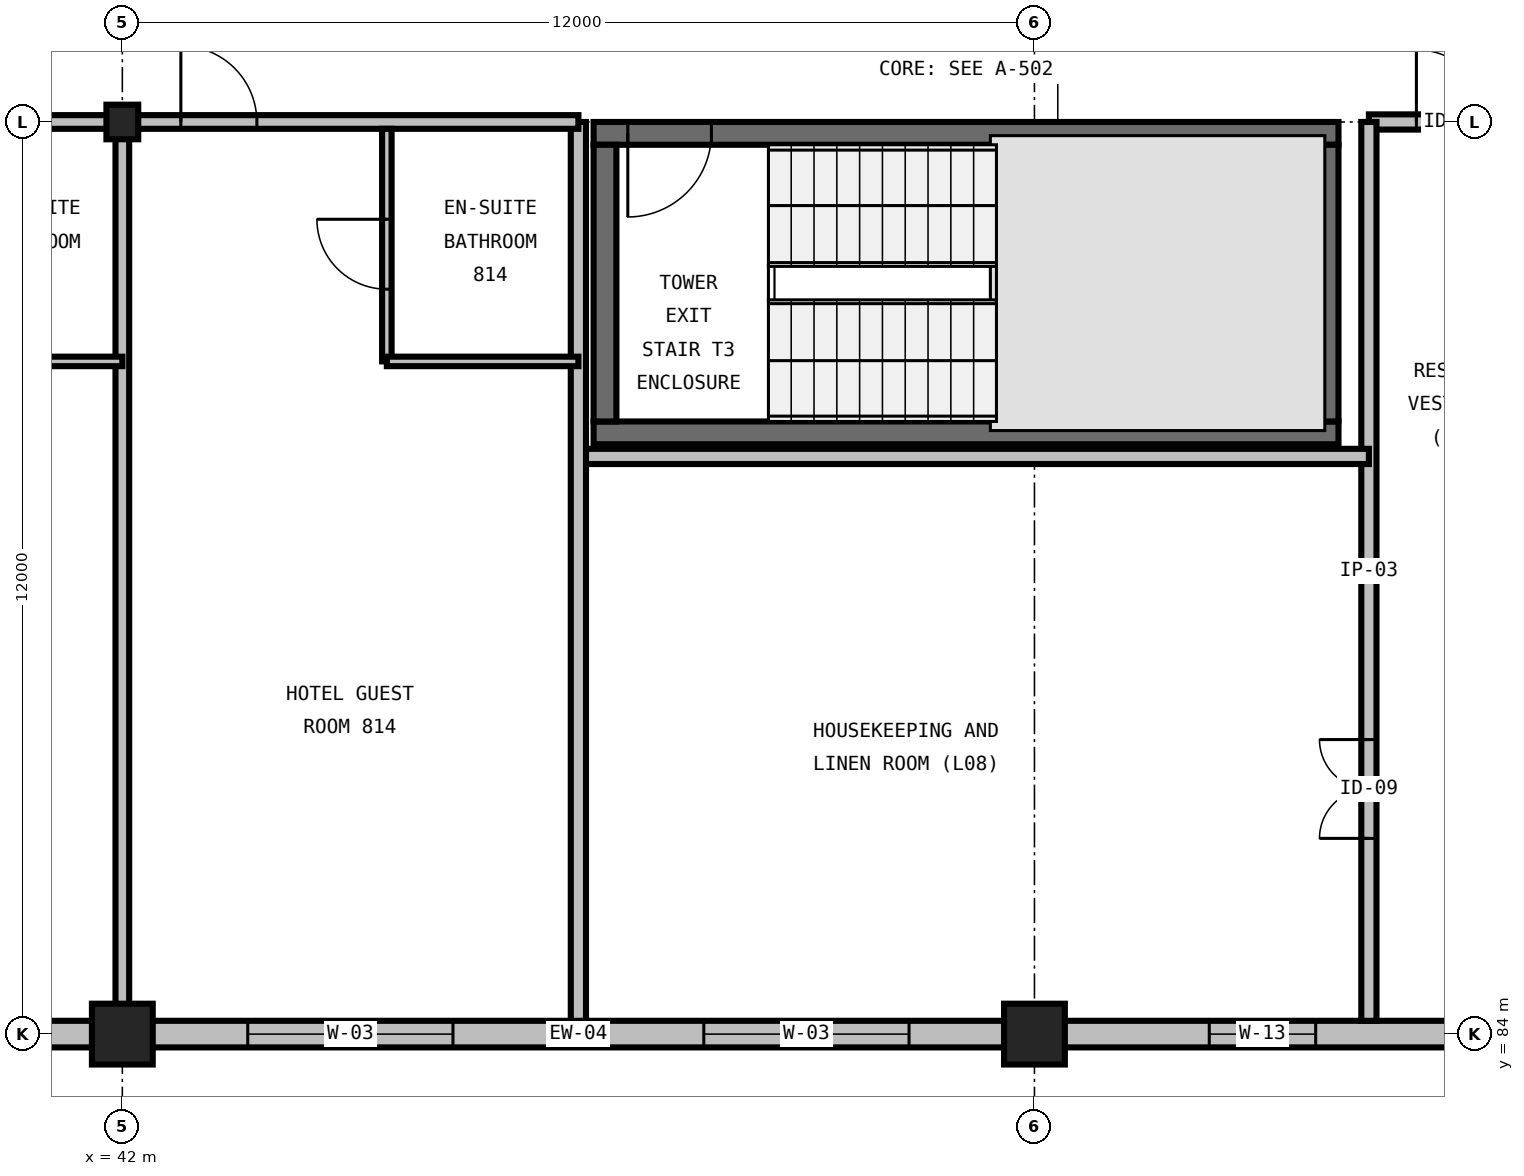
"""IFC4 building model, lengths in metres.
Left out: names, types, materials, properties, quantities, classifications, styles, units other than length and angle.
Written with IfcOpenShell. Run it as: python <this file> out.ifc"""

import sys

from ifc_helpers import new_model, si_unit, direction, frame, frame_2d, origin, origin_2d, place, context, subcontext, project, spatial, rectangle, i_section, extrude, element, fill, save


model = new_model("IFC4")
c1 = context("Model", 3, precision=1e-05, world=origin(), true_north=direction((0.0, 1.0)))
c2 = subcontext(c1, "Body", "Model", "MODEL_VIEW")
j1 = project(units=[si_unit("LENGTHUNIT", "METRE"), si_unit("PLANEANGLEUNIT", "RADIAN")], contexts=[c1])
p1 = place(None, origin())
s1 = spatial("IfcSite", under=j1, at=p1, CompositionType="ELEMENT")
p2 = place(p1, origin())
s2 = spatial("IfcBuilding", under=s1, at=p2, CompositionType="ELEMENT")
p3 = place(p2, frame((0.0, 0.0, 38.4)))
s3 = spatial("IfcBuildingStorey", under=s2, at=p3, CompositionType="ELEMENT", Elevation=38.4)
p4 = place(p3, frame((42.0, 84.0, 0.0), z_axis=(0.0, 0.0, 1.0), x_axis=(1.0, 0.0, 0.0)))
e1 = element("IfcColumn", 1, at=p4, inside=s3, PredefinedType="COLUMN", context=c2, shape_type="SweptSolid", body=[
    extrude(rectangle(XDim=0.8, YDim=0.8, at=origin_2d()), origin(), (0.0, 0.0, 1.0), 3.6),
])
p5 = place(p3, frame((42.0, 96.0, 0.0), z_axis=(0.0, 0.0, 1.0), x_axis=(1.0, 0.0, 0.0)))
e2 = element("IfcColumn", 2, at=p5, inside=s3, PredefinedType="COLUMN", context=c2, shape_type="SweptSolid", body=[
    extrude(i_section(OverallWidth=0.419, OverallDepth=0.455, WebThickness=0.042, FlangeThickness=0.068, FilletRadius=0.031, at=origin_2d()), origin(), (0.0, 0.0, 1.0), 3.6),
])
p6 = place(p3, frame((54.0, 84.0, 0.0), z_axis=(0.0, 0.0, 1.0), x_axis=(1.0, 0.0, 0.0)))
e3 = element("IfcColumn", 3, at=p6, inside=s3, PredefinedType="COLUMN", context=c2, shape_type="SweptSolid", body=[
    extrude(rectangle(XDim=0.8, YDim=0.8, at=origin_2d()), origin(), (0.0, 0.0, 1.0), 3.6),
])
p7 = place(p3, frame((48.2, 91.91, 0.0), z_axis=(0.0, 0.0, 1.0), x_axis=(1.0, 0.0, 0.0)))
e4 = element("IfcWall", 4, at=p7, inside=s3, PredefinedType="SHEAR", context=c2, shape_type="SweptSolid", body=[
    extrude(rectangle(XDim=9.8, YDim=0.3, at=frame_2d((4.9, 0.0))), origin(), (0.0, 0.0, 1.0), 3.6),
])
p8 = place(p3, frame((58.0, 95.85, 0.0), z_axis=(0.0, 0.0, 1.0), x_axis=(-1.0, 0.0, 0.0)))
e5 = element("IfcWall", 5, at=p8, inside=s3, PredefinedType="SHEAR", context=c2, shape_type="SweptSolid", body=[
    extrude(rectangle(XDim=9.8, YDim=0.3, at=frame_2d((4.9, 0.0))), origin(), (0.0, 0.0, 1.0), 3.6),
])
p9 = place(p8, frame((8.25, 0.0, 0.0)))
e6 = element("IfcOpeningElement", 6, at=p9, cuts=e5, PredefinedType="OPENING", context=c2, shape_type="SweptSolid", body=[
    extrude(rectangle(XDim=1.1, YDim=2.2, at=frame_2d((0.55, 1.1))), frame((0.0, 0.165, 0.0), z_axis=(0.0, -1.0, 0.0), x_axis=(1.0, 0.0, 0.0)), (0.0, 0.0, 1.0), 0.33),
])
for number, where, z_axis, x_axis in (
    (7, (48.35, 95.7, 0.0), (0.0, 0.0, 1.0), (0.0, -1.0, 0.0)),
    (8, (57.85, 92.06, 0.0), (0.0, 0.0, 1.0), (0.0, 1.0, 0.0)),
):
    element("IfcWall", number, at=place(p3, frame(where, z_axis=z_axis, x_axis=x_axis)), inside=s3, PredefinedType="SHEAR", context=c2, shape_type="SweptSolid", body=[
        extrude(rectangle(XDim=3.64, YDim=0.3, at=frame_2d((1.82, 0.0))), origin(), (0.0, 0.0, 1.0), 3.6),
    ])
p10 = place(p3, frame((36.0, 84.0, 0.0), z_axis=(0.0, 0.0, 1.0), x_axis=(1.0, 0.0, 0.0)))
e9 = element("IfcWall", 9, at=p10, inside=s3, PredefinedType="STANDARD", context=c2, shape_type="SweptSolid", body=[
    extrude(rectangle(XDim=6.0, YDim=0.35, at=frame_2d((3.0, 0.0))), origin(), (0.0, 0.0, 1.0), 2.486),
])
p11 = place(p10, frame((1.65, 0.0, 0.72)))
e10 = element("IfcOpeningElement", 10, at=p11, cuts=e9, PredefinedType="OPENING", context=c2, shape_type="SweptSolid", body=[
    extrude(rectangle(XDim=2.7, YDim=1.65, at=frame_2d((1.35, 0.825))), frame((0.0, 0.19, 0.0), z_axis=(0.0, -1.0, 0.0), x_axis=(1.0, 0.0, 0.0)), (0.0, 0.0, 1.0), 0.38),
])
p12 = place(p3, frame((42.0, 84.0, 0.0), z_axis=(0.0, 0.0, 1.0), x_axis=(1.0, 0.0, 0.0)))
e11 = element("IfcWall", 11, at=p12, inside=s3, PredefinedType="STANDARD", context=c2, shape_type="SweptSolid", body=[
    extrude(rectangle(XDim=12.0, YDim=0.35, at=frame_2d((6.0, 0.0))), origin(), (0.0, 0.0, 1.0), 2.486),
])
p13 = place(p12, frame((1.65, 0.0, 0.72)))
e12 = element("IfcOpeningElement", 12, at=p13, cuts=e11, PredefinedType="OPENING", context=c2, shape_type="SweptSolid", body=[
    extrude(rectangle(XDim=2.7, YDim=1.65, at=frame_2d((1.35, 0.825))), frame((0.0, 0.19, 0.0), z_axis=(0.0, -1.0, 0.0), x_axis=(1.0, 0.0, 0.0)), (0.0, 0.0, 1.0), 0.38),
])
p14 = place(p12, frame((7.65, 0.0, 0.72)))
e13 = element("IfcOpeningElement", 13, at=p14, cuts=e11, PredefinedType="OPENING", context=c2, shape_type="SweptSolid", body=[
    extrude(rectangle(XDim=2.7, YDim=1.65, at=frame_2d((1.35, 0.825))), frame((0.0, 0.19, 0.0), z_axis=(0.0, -1.0, 0.0), x_axis=(1.0, 0.0, 0.0)), (0.0, 0.0, 1.0), 0.38),
])
p15 = place(p3, frame((54.0, 84.0, 0.0), z_axis=(0.0, 0.0, 1.0), x_axis=(1.0, 0.0, 0.0)))
e14 = element("IfcWall", 14, at=p15, inside=s3, PredefinedType="STANDARD", context=c2, shape_type="SweptSolid", body=[
    extrude(rectangle(XDim=12.0, YDim=0.35, at=frame_2d((6.0, 0.0))), origin(), (0.0, 0.0, 1.0), 2.486),
])
p16 = place(p15, frame((2.3, 0.0, 1.0)))
e15 = element("IfcOpeningElement", 15, at=p16, cuts=e14, PredefinedType="OPENING", context=c2, shape_type="SweptSolid", body=[
    extrude(rectangle(XDim=1.4, YDim=1.4, at=frame_2d((0.7, 0.7))), frame((0.0, 0.19, 0.0), z_axis=(0.0, -1.0, 0.0), x_axis=(1.0, 0.0, 0.0)), (0.0, 0.0, 1.0), 0.38),
])
p17 = place(p15, frame((8.25, 0.0, 1.0)))
e16 = element("IfcOpeningElement", 16, at=p17, cuts=e14, PredefinedType="OPENING", context=c2, shape_type="SweptSolid", body=[
    extrude(rectangle(XDim=1.5, YDim=1.35, at=frame_2d((0.75, 0.675))), frame((0.0, 0.19, 0.0), z_axis=(0.0, -1.0, 0.0), x_axis=(1.0, 0.0, 0.0)), (0.0, 0.0, 1.0), 0.38),
])
p18 = place(p3, frame((58.4, 96.0, 0.0), z_axis=(0.0, 0.0, 1.0), x_axis=(1.0, 0.0, 0.0)))
e17 = element("IfcWall", 17, at=p18, inside=s3, PredefinedType="PARTITIONING", context=c2, shape_type="SweptSolid", body=[
    extrude(rectangle(XDim=2.4, YDim=0.2, at=frame_2d((1.2, 0.0))), origin(), (0.0, 0.0, 1.0), 2.359),
])
p19 = place(p18, frame((0.625, 0.0, 0.0)))
e18 = element("IfcOpeningElement", 18, at=p19, cuts=e17, PredefinedType="OPENING", context=c2, shape_type="SweptSolid", body=[
    extrude(rectangle(XDim=0.95, YDim=2.15, at=frame_2d((0.475, 1.075))), frame((0.0, 0.115, 0.0), z_axis=(0.0, -1.0, 0.0), x_axis=(1.0, 0.0, 0.0)), (0.0, 0.0, 1.0), 0.23),
])
p20 = place(p3, frame((58.4, 84.175, 0.0), z_axis=(0.0, 0.0, 1.0), x_axis=(0.0, 1.0, 0.0)))
e19 = element("IfcWall", 19, at=p20, inside=s3, PredefinedType="PARTITIONING", context=c2, shape_type="SweptSolid", body=[
    extrude(rectangle(XDim=11.825, YDim=0.2, at=frame_2d((5.913, 0.0))), origin(), (0.0, 0.0, 1.0), 3.29),
])
p21 = place(p20, frame((2.4, 0.0, 0.0)))
e20 = element("IfcOpeningElement", 20, at=p21, cuts=e19, PredefinedType="OPENING", context=c2, shape_type="SweptSolid", body=[
    extrude(rectangle(XDim=1.3, YDim=2.2, at=frame_2d((0.65, 1.1))), frame((0.0, 0.115, 0.0), z_axis=(0.0, -1.0, 0.0), x_axis=(1.0, 0.0, 0.0)), (0.0, 0.0, 1.0), 0.23),
])
p22 = place(p3, frame((48.0, 91.6, 0.0), z_axis=(0.0, 0.0, 1.0), x_axis=(1.0, 0.0, 0.0)))
e21 = element("IfcWall", 21, at=p22, inside=s3, PredefinedType="PARTITIONING", context=c2, shape_type="SweptSolid", body=[
    extrude(rectangle(XDim=10.4, YDim=0.2, at=frame_2d((5.2, 0.0))), origin(), (0.0, 0.0, 1.0), 3.29),
])
p23 = place(p3, frame((48.0, 84.175, 0.0), z_axis=(0.0, 0.0, 1.0), x_axis=(0.0, 1.0, 0.0)))
e22 = element("IfcWall", 22, at=p23, inside=s3, PredefinedType="PARTITIONING", context=c2, shape_type="SweptSolid", body=[
    extrude(rectangle(XDim=11.825, YDim=0.2, at=frame_2d((5.913, 0.0))), origin(), (0.0, 0.0, 1.0), 3.29),
])
p24 = place(p3, frame((36.0, 96.0, 0.0), z_axis=(0.0, 0.0, 1.0), x_axis=(1.0, 0.0, 0.0)))
e23 = element("IfcWall", 23, at=p24, inside=s3, PredefinedType="PARTITIONING", context=c2, shape_type="SweptSolid", body=[
    extrude(rectangle(XDim=6.0, YDim=0.18, at=frame_2d((3.0, 0.0))), origin(), (0.0, 0.0, 1.0), 2.736),
])
p25 = place(p24, frame((0.77, 0.0, 0.0)))
e24 = element("IfcOpeningElement", 24, at=p25, cuts=e23, PredefinedType="OPENING", context=c2, shape_type="SweptSolid", body=[
    extrude(rectangle(XDim=1.0, YDim=2.15, at=frame_2d((0.5, 1.075))), frame((0.0, 0.105, 0.0), z_axis=(0.0, -1.0, 0.0), x_axis=(1.0, 0.0, 0.0)), (0.0, 0.0, 1.0), 0.21),
])
p26 = place(p3, frame((42.0, 84.175, 0.0), z_axis=(0.0, 0.0, 1.0), x_axis=(0.0, 1.0, 0.0)))
e25 = element("IfcWall", 25, at=p26, inside=s3, PredefinedType="PARTITIONING", context=c2, shape_type="SweptSolid", body=[
    extrude(rectangle(XDim=11.825, YDim=0.18, at=frame_2d((5.913, 0.0))), origin(), (0.0, 0.0, 1.0), 2.59),
])
p27 = place(p3, frame((39.48, 92.85, 0.0), z_axis=(0.0, 0.0, 1.0), x_axis=(1.0, 0.0, 0.0)))
e26 = element("IfcWall", 26, at=p27, inside=s3, PredefinedType="PARTITIONING", context=c2, shape_type="SweptSolid", body=[
    extrude(rectangle(XDim=2.52, YDim=0.125, at=frame_2d((1.26, 0.0))), origin(), (0.0, 0.0, 1.0), 3.29),
])
p28 = place(p3, frame((42.0, 96.0, 0.0), z_axis=(0.0, 0.0, 1.0), x_axis=(1.0, 0.0, 0.0)))
e27 = element("IfcWall", 27, at=p28, inside=s3, PredefinedType="PARTITIONING", context=c2, shape_type="SweptSolid", body=[
    extrude(rectangle(XDim=6.0, YDim=0.18, at=frame_2d((3.0, 0.0))), origin(), (0.0, 0.0, 1.0), 2.359),
])
p29 = place(p28, frame((0.77, 0.0, 0.0)))
e28 = element("IfcOpeningElement", 28, at=p29, cuts=e27, PredefinedType="OPENING", context=c2, shape_type="SweptSolid", body=[
    extrude(rectangle(XDim=1.0, YDim=2.15, at=frame_2d((0.5, 1.075))), frame((0.0, 0.105, 0.0), z_axis=(0.0, -1.0, 0.0), x_axis=(1.0, 0.0, 0.0)), (0.0, 0.0, 1.0), 0.21),
])
p30 = place(p3, frame((45.48, 92.85, 0.0), z_axis=(0.0, 0.0, 1.0), x_axis=(0.0, 1.0, 0.0)))
e29 = element("IfcWall", 29, at=p30, inside=s3, PredefinedType="PARTITIONING", context=c2, shape_type="SweptSolid", body=[
    extrude(rectangle(XDim=3.06, YDim=0.125, at=frame_2d((1.53, 0.0))), origin(), (0.0, 0.0, 1.0), 3.29),
])
p31 = place(p30, frame((0.95, 0.0, 0.0)))
e30 = element("IfcOpeningElement", 30, at=p31, cuts=e29, PredefinedType="OPENING", context=c2, shape_type="SweptSolid", body=[
    extrude(rectangle(XDim=0.92, YDim=2.1, at=frame_2d((0.46, 1.05))), frame((0.0, 0.077, 0.0), z_axis=(0.0, -1.0, 0.0), x_axis=(1.0, 0.0, 0.0)), (0.0, 0.0, 1.0), 0.155),
])
p32 = place(p3, frame((45.48, 92.85, 0.0), z_axis=(0.0, 0.0, 1.0), x_axis=(1.0, 0.0, 0.0)))
e31 = element("IfcWall", 31, at=p32, inside=s3, PredefinedType="PARTITIONING", context=c2, shape_type="SweptSolid", body=[
    extrude(rectangle(XDim=2.52, YDim=0.125, at=frame_2d((1.26, 0.0))), origin(), (0.0, 0.0, 1.0), 3.29),
])
p33 = place(p9, origin())
e32 = element("IfcDoor", 32, at=p33, inside=s3, OperationType="SINGLE_SWING_RIGHT", PredefinedType="DOOR", context=c2, shape_type="SweptSolid", body=[
    extrude(rectangle(XDim=1.1, YDim=2.2, at=frame_2d((0.55, 1.1))), frame((0.0, 0.025, 0.0), z_axis=(0.0, -1.0, 0.0), x_axis=(1.0, 0.0, 0.0)), (0.0, 0.0, 1.0), 0.05),
])
fill(e6, e32)
p34 = place(p13, origin())
e33 = element("IfcWindow", 33, at=p34, inside=s3, PartitioningType="TRIPLE_PANEL_VERTICAL", PredefinedType="WINDOW", context=c2, shape_type="SweptSolid", body=[
    extrude(rectangle(XDim=2.7, YDim=1.65, at=frame_2d((1.35, 0.825))), frame((0.0, 0.03, 0.0), z_axis=(0.0, -1.0, 0.0), x_axis=(1.0, 0.0, 0.0)), (0.0, 0.0, 1.0), 0.06),
])
fill(e12, e33)
p35 = place(p14, origin())
e34 = element("IfcWindow", 34, at=p35, inside=s3, PartitioningType="TRIPLE_PANEL_VERTICAL", PredefinedType="WINDOW", context=c2, shape_type="SweptSolid", body=[
    extrude(rectangle(XDim=2.7, YDim=1.65, at=frame_2d((1.35, 0.825))), frame((0.0, 0.03, 0.0), z_axis=(0.0, -1.0, 0.0), x_axis=(1.0, 0.0, 0.0)), (0.0, 0.0, 1.0), 0.06),
])
fill(e13, e34)
p36 = place(p16, origin())
e35 = element("IfcWindow", 35, at=p36, inside=s3, PartitioningType="SINGLE_PANEL", PredefinedType="WINDOW", context=c2, shape_type="SweptSolid", body=[
    extrude(rectangle(XDim=1.4, YDim=1.4, at=frame_2d((0.7, 0.7))), frame((0.0, 0.03, 0.0), z_axis=(0.0, -1.0, 0.0), x_axis=(1.0, 0.0, 0.0)), (0.0, 0.0, 1.0), 0.06),
])
fill(e15, e35)
p37 = place(p19, origin())
e36 = element("IfcDoor", 36, at=p37, inside=s3, OperationType="SINGLE_SWING_LEFT", PredefinedType="DOOR", context=c2, shape_type="SweptSolid", body=[
    extrude(rectangle(XDim=0.95, YDim=2.15, at=frame_2d((0.475, 1.075))), frame((0.0, 0.025, 0.0), z_axis=(0.0, -1.0, 0.0), x_axis=(1.0, 0.0, 0.0)), (0.0, 0.0, 1.0), 0.05),
])
fill(e18, e36)
p38 = place(p21, origin())
e37 = element("IfcDoor", 37, at=p38, inside=s3, OperationType="DOUBLE_DOOR_SINGLE_SWING", PredefinedType="DOOR", context=c2, shape_type="SweptSolid", body=[
    extrude(rectangle(XDim=1.3, YDim=2.2, at=frame_2d((0.65, 1.1))), frame((0.0, 0.025, 0.0), z_axis=(0.0, -1.0, 0.0), x_axis=(1.0, 0.0, 0.0)), (0.0, 0.0, 1.0), 0.05),
])
fill(e20, e37)
p39 = place(p29, origin())
e38 = element("IfcDoor", 38, at=p39, inside=s3, OperationType="SINGLE_SWING_LEFT", PredefinedType="DOOR", context=c2, shape_type="SweptSolid", body=[
    extrude(rectangle(XDim=1.0, YDim=2.15, at=frame_2d((0.5, 1.075))), frame((0.0, 0.025, 0.0), z_axis=(0.0, -1.0, 0.0), x_axis=(1.0, 0.0, 0.0)), (0.0, 0.0, 1.0), 0.05),
])
fill(e28, e38)
p40 = place(p31, origin())
e39 = element("IfcDoor", 39, at=p40, inside=s3, OperationType="SINGLE_SWING_RIGHT", PredefinedType="DOOR", context=c2, shape_type="SweptSolid", body=[
    extrude(rectangle(XDim=0.92, YDim=2.1, at=frame_2d((0.46, 1.05))), frame((0.0, 0.025, 0.0), z_axis=(0.0, -1.0, 0.0), x_axis=(1.0, 0.0, 0.0)), (0.0, 0.0, 1.0), 0.05),
])
fill(e30, e39)
save(model, sys.argv[1])
